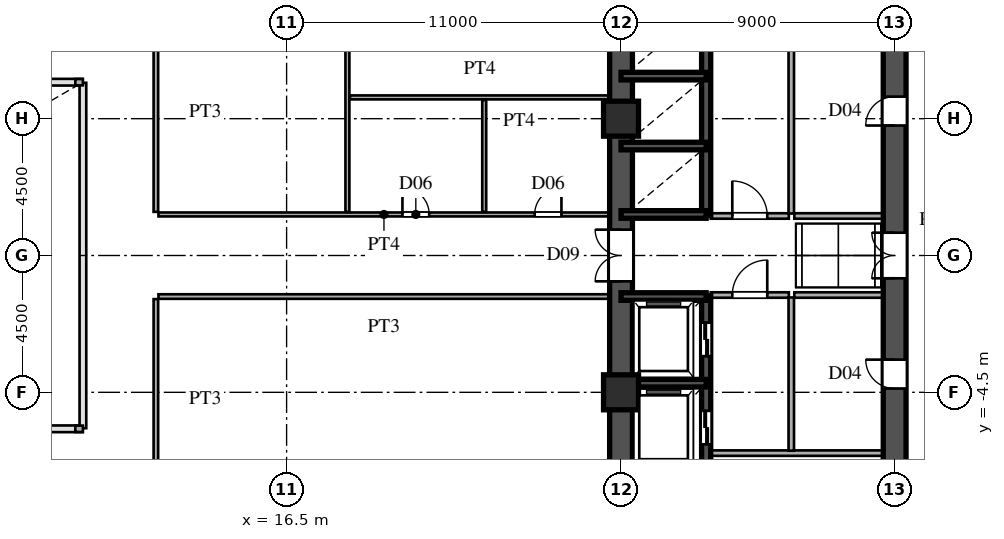
"""IFC4 building model, lengths in metres.
Left out: names, types, materials, properties, quantities, classifications, styles, units other than length and angle.
Written with IfcOpenShell. Run it as: python <this file> out.ifc"""

import sys

from ifc_helpers import new_model, si_unit, direction, frame, frame_2d, origin, origin_2d, place, context, subcontext, project, spatial, rectangle, hollow_rectangle, extrude, source, transform, mapped, element, fill, save


model = new_model("IFC4")
c1 = context("Model", 3, precision=1e-05, world=origin(), true_north=direction((0.0, 1.0)))
c2 = subcontext(c1, "Body", "Model", "MODEL_VIEW")
j1 = project(units=[si_unit("LENGTHUNIT", "METRE"), si_unit("PLANEANGLEUNIT", "RADIAN")], contexts=[c1])
p1 = place(None, origin())
s1 = spatial("IfcSite", under=j1, at=p1, CompositionType="ELEMENT")
p2 = place(p1, origin())
s2 = spatial("IfcBuilding", under=s1, at=p2, CompositionType="ELEMENT")
p3 = place(p2, frame((0.0, 0.0, 14.4)))
s3 = spatial("IfcBuildingStorey", under=s2, at=p3, CompositionType="ELEMENT", Elevation=14.4)
m1 = source(origin(), c2, "Body", "SweptSolid", [
    extrude(hollow_rectangle(XDim=1.15, YDim=1.15, WallThickness=0.048, at=origin_2d()), origin(), (0.0, 0.0, 1.0), 4.5),
])
for number, where, z_axis, x_axis in (
    (1, (27.5, -4.5, 0.0), (0.0, 0.0, 1.0), (1.0, 0.0, 0.0)),
    (2, (27.5, 4.5, 0.0), (0.0, 0.0, 1.0), (1.0, 0.0, 0.0)),
):
    element("IfcColumn", number, at=place(p3, frame(where, z_axis=z_axis, x_axis=x_axis)), inside=s3, PredefinedType="COLUMN", context=c2, shape_type="MappedRepresentation", body=[
        mapped(m1, transform((0.0, 0.0, 0.0), scale=1.0)),
    ])
for number, where, z_axis, x_axis in (
    (3, (9.8, -5.7, 0.0), (0.0, 0.0, 1.0), (-1.0, 0.0, 0.0)),
    (4, (9.8, 5.7, 0.0), (0.0, 0.0, 1.0), (-1.0, 0.0, 0.0)),
):
    element("IfcWall", number, at=place(p3, frame(where, z_axis=z_axis, x_axis=x_axis)), inside=s3, PredefinedType="SOLIDWALL", context=c2, shape_type="SweptSolid", body=[
        extrude(rectangle(XDim=0.25, YDim=0.21, at=frame_2d((0.125, 0.0))), origin(), (0.0, 0.0, 1.0), 4.28),
    ])
for number, where, z_axis, x_axis in (
    (5, (27.5, -13.5, 0.0), (0.0, 0.0, 1.0), (0.0, 1.0, 0.0)),
    (6, (27.5, 1.3, 0.0), (0.0, 0.0, 1.0), (0.0, 1.0, 0.0)),
):
    element("IfcWall", number, at=place(p3, frame(where, z_axis=z_axis, x_axis=x_axis)), inside=s3, PredefinedType="SHEAR", context=c2, shape_type="SweptSolid", body=[
        extrude(rectangle(XDim=12.2, YDim=0.75, at=frame_2d((6.1, 0.0))), origin(), (0.0, 0.0, 1.0), 4.28),
    ])
p4 = place(p3, frame((27.5, -1.3, 0.0), z_axis=(0.0, 0.0, 1.0), x_axis=(0.0, 1.0, 0.0)))
e7 = element("IfcWall", 7, at=p4, inside=s3, PredefinedType="SHEAR", context=c2, shape_type="SweptSolid", body=[
    extrude(rectangle(XDim=2.6, YDim=0.75, at=frame_2d((1.3, 0.0))), origin(), (0.0, 0.0, 1.0), 4.28),
])
p5 = place(p4, frame((0.45, 0.0, 0.0)))
e8 = element("IfcOpeningElement", 8, at=p5, cuts=e7, PredefinedType="OPENING", context=c2, shape_type="SweptSolid", body=[
    extrude(rectangle(XDim=1.7, YDim=2.35, at=frame_2d((0.85, 1.175))), frame((0.0, 0.385, 0.0), z_axis=(0.0, -1.0, 0.0), x_axis=(1.0, 0.0, 0.0)), (0.0, 0.0, 1.0), 0.77),
])
p6 = place(p3, frame((36.5, -13.65, 0.0), z_axis=(0.0, 0.0, 1.0), x_axis=(0.0, 1.0, 0.0)))
e9 = element("IfcWall", 9, at=p6, inside=s3, PredefinedType="SHEAR", context=c2, shape_type="SweptSolid", body=[
    extrude(rectangle(XDim=7.15, YDim=0.75, at=frame_2d((3.575, 0.0))), origin(), (0.0, 0.0, 1.0), 4.28),
])
p7 = place(p6, frame((4.675, 0.0, 0.0)))
e10 = element("IfcOpeningElement", 10, at=p7, cuts=e9, PredefinedType="OPENING", context=c2, shape_type="SweptSolid", body=[
    extrude(rectangle(XDim=1.15, YDim=2.2, at=frame_2d((0.575, 1.1))), frame((0.0, 0.385, 0.0), z_axis=(0.0, -1.0, 0.0), x_axis=(1.0, 0.0, 0.0)), (0.0, 0.0, 1.0), 0.77),
])
p8 = place(p3, frame((36.5, -1.3, 0.0), z_axis=(0.0, 0.0, 1.0), x_axis=(0.0, 1.0, 0.0)))
e11 = element("IfcWall", 11, at=p8, inside=s3, PredefinedType="SHEAR", context=c2, shape_type="SweptSolid", body=[
    extrude(rectangle(XDim=2.6, YDim=0.75, at=frame_2d((1.3, 0.0))), origin(), (0.0, 0.0, 1.0), 4.28),
])
p9 = place(p8, frame((0.55, 0.0, 0.0)))
e12 = element("IfcOpeningElement", 12, at=p9, cuts=e11, PredefinedType="OPENING", context=c2, shape_type="SweptSolid", body=[
    extrude(rectangle(XDim=1.5, YDim=2.3, at=frame_2d((0.75, 1.15))), frame((0.0, 0.385, 0.0), z_axis=(0.0, -1.0, 0.0), x_axis=(1.0, 0.0, 0.0)), (0.0, 0.0, 1.0), 0.77),
])
p10 = place(p3, frame((36.5, -6.5, 0.0), z_axis=(0.0, 0.0, 1.0), x_axis=(0.0, 1.0, 0.0)))
e13 = element("IfcWall", 13, at=p10, inside=s3, PredefinedType="SHEAR", context=c2, shape_type="SweptSolid", body=[
    extrude(rectangle(XDim=5.2, YDim=0.75, at=frame_2d((2.6, 0.0))), origin(), (0.0, 0.0, 1.0), 4.28),
])
p11 = place(p10, frame((2.125, 0.0, 0.0)))
e14 = element("IfcOpeningElement", 14, at=p11, cuts=e13, PredefinedType="OPENING", context=c2, shape_type="SweptSolid", body=[
    extrude(rectangle(XDim=0.95, YDim=2.15, at=frame_2d((0.475, 1.075))), frame((0.0, 0.385, 0.0), z_axis=(0.0, -1.0, 0.0), x_axis=(1.0, 0.0, 0.0)), (0.0, 0.0, 1.0), 0.77),
])
p12 = place(p3, frame((36.5, 1.3, 0.0), z_axis=(0.0, 0.0, 1.0), x_axis=(0.0, 1.0, 0.0)))
e15 = element("IfcWall", 15, at=p12, inside=s3, PredefinedType="SHEAR", context=c2, shape_type="SweptSolid", body=[
    extrude(rectangle(XDim=6.9, YDim=0.75, at=frame_2d((3.45, 0.0))), origin(), (0.0, 0.0, 1.0), 4.28),
])
p13 = place(p12, frame((2.975, 0.0, 0.0)))
e16 = element("IfcOpeningElement", 16, at=p13, cuts=e15, PredefinedType="OPENING", context=c2, shape_type="SweptSolid", body=[
    extrude(rectangle(XDim=0.95, YDim=2.15, at=frame_2d((0.475, 1.075))), frame((0.0, 0.385, 0.0), z_axis=(0.0, -1.0, 0.0), x_axis=(1.0, 0.0, 0.0)), (0.0, 0.0, 1.0), 0.77),
])
for number, where, z_axis, x_axis in (
    (17, (27.5, -4.2, 0.0), (0.0, 0.0, 1.0), (1.0, 0.0, 0.0)),
    (18, (27.5, -1.35, 0.0), (0.0, 0.0, 1.0), (1.0, 0.0, 0.0)),
    (19, (27.5, 1.35, 0.0), (0.0, 0.0, 1.0), (1.0, 0.0, 0.0)),
    (20, (27.5, 3.6, 0.0), (0.0, 0.0, 1.0), (1.0, 0.0, 0.0)),
    (21, (27.5, 5.9, 0.0), (0.0, 0.0, 1.0), (1.0, 0.0, 0.0)),
):
    element("IfcWall", number, at=place(p3, frame(where, z_axis=z_axis, x_axis=x_axis)), inside=s3, PredefinedType="SHEAR", context=c2, shape_type="SweptSolid", body=[
        extrude(rectangle(XDim=2.8, YDim=0.25, at=frame_2d((1.4, 0.0))), origin(), (0.0, 0.0, 1.0), 4.28),
    ])
p14 = place(p3, frame((30.3, -7.12, 0.0), z_axis=(0.0, 0.0, 1.0), x_axis=(0.0, 1.0, 0.0)))
e22 = element("IfcWall", 22, at=p14, inside=s3, PredefinedType="SHEAR", context=c2, shape_type="SweptSolid", body=[
    extrude(rectangle(XDim=2.92, YDim=0.3, at=frame_2d((1.46, 0.0))), origin(), (0.0, 0.0, 1.0), 4.28),
])
p15 = place(p14, frame((0.91, 0.0, 0.0)))
e23 = element("IfcOpeningElement", 23, at=p15, cuts=e22, PredefinedType="OPENING", context=c2, shape_type="SweptSolid", body=[
    extrude(rectangle(XDim=1.1, YDim=2.2, at=frame_2d((0.55, 1.1))), frame((0.0, 0.16, 0.0), z_axis=(0.0, -1.0, 0.0), x_axis=(1.0, 0.0, 0.0)), (0.0, 0.0, 1.0), 0.32),
])
p16 = place(p3, frame((30.3, -4.2, 0.0), z_axis=(0.0, 0.0, 1.0), x_axis=(0.0, 1.0, 0.0)))
e24 = element("IfcWall", 24, at=p16, inside=s3, PredefinedType="SHEAR", context=c2, shape_type="SweptSolid", body=[
    extrude(rectangle(XDim=2.88, YDim=0.3, at=frame_2d((1.44, 0.0))), origin(), (0.0, 0.0, 1.0), 4.28),
])
p17 = place(p16, frame((0.89, 0.0, 0.0)))
e25 = element("IfcOpeningElement", 25, at=p17, cuts=e24, PredefinedType="OPENING", context=c2, shape_type="SweptSolid", body=[
    extrude(rectangle(XDim=1.1, YDim=2.2, at=frame_2d((0.55, 1.1))), frame((0.0, 0.16, 0.0), z_axis=(0.0, -1.0, 0.0), x_axis=(1.0, 0.0, 0.0)), (0.0, 0.0, 1.0), 0.32),
])
p18 = place(p3, frame((30.3, 1.32, 0.0), z_axis=(0.0, 0.0, 1.0), x_axis=(0.0, 1.0, 0.0)))
e26 = element("IfcWall", 26, at=p18, inside=s3, PredefinedType="SHEAR", context=c2, shape_type="SweptSolid", body=[
    extrude(rectangle(XDim=2.28, YDim=0.3, at=frame_2d((1.14, 0.0))), origin(), (0.0, 0.0, 1.0), 4.28),
])
p19 = place(p3, frame((30.3, 3.6, 0.0), z_axis=(0.0, 0.0, 1.0), x_axis=(0.0, 1.0, 0.0)))
e27 = element("IfcWall", 27, at=p19, inside=s3, PredefinedType="SHEAR", context=c2, shape_type="SweptSolid", body=[
    extrude(rectangle(XDim=2.3, YDim=0.3, at=frame_2d((1.15, 0.0))), origin(), (0.0, 0.0, 1.0), 4.28),
])
p20 = place(p3, frame((30.3, 5.9, 0.0), z_axis=(0.0, 0.0, 1.0), x_axis=(0.0, 1.0, 0.0)))
e28 = element("IfcWall", 28, at=p20, inside=s3, PredefinedType="SHEAR", context=c2, shape_type="SweptSolid", body=[
    extrude(rectangle(XDim=2.25, YDim=0.3, at=frame_2d((1.125, 0.0))), origin(), (0.0, 0.0, 1.0), 4.28),
])
p21 = place(p3, frame((30.45, -6.5, 0.0), z_axis=(0.0, 0.0, 1.0), x_axis=(1.0, 0.0, 0.0)))
e29 = element("IfcWall", 29, at=p21, inside=s3, PredefinedType="PARTITIONING", context=c2, shape_type="SweptSolid", body=[
    extrude(rectangle(XDim=5.7, YDim=0.18, at=frame_2d((2.85, 0.0))), origin(), (0.0, 0.0, 1.0), 4.28),
])
p22 = place(p3, frame((33.1, -6.42, 0.0), z_axis=(0.0, 0.0, 1.0), x_axis=(0.0, 1.0, 0.0)))
e30 = element("IfcWall", 30, at=p22, inside=s3, PredefinedType="PARTITIONING", context=c2, shape_type="SweptSolid", body=[
    extrude(rectangle(XDim=5.04, YDim=0.18, at=frame_2d((2.52, 0.0))), origin(), (0.0, 0.0, 1.0), 4.28),
])
p23 = place(p3, frame((33.1, 1.38, 0.0), z_axis=(0.0, 0.0, 1.0), x_axis=(0.0, 1.0, 0.0)))
e31 = element("IfcWall", 31, at=p23, inside=s3, PredefinedType="PARTITIONING", context=c2, shape_type="SweptSolid", body=[
    extrude(rectangle(XDim=6.74, YDim=0.18, at=frame_2d((3.37, 0.0))), origin(), (0.0, 0.0, 1.0), 4.28),
])
p24 = place(p3, frame((30.45, -1.3, 0.0), z_axis=(0.0, 0.0, 1.0), x_axis=(1.0, 0.0, 0.0)))
e32 = element("IfcWall", 32, at=p24, inside=s3, PredefinedType="PARTITIONING", context=c2, shape_type="SweptSolid", body=[
    extrude(rectangle(XDim=2.57, YDim=0.18, at=frame_2d((1.285, 0.0))), origin(), (0.0, 0.0, 1.0), 4.28),
])
p25 = place(p24, frame((0.71, 0.0, 0.0)))
e33 = element("IfcOpeningElement", 33, at=p25, cuts=e32, PredefinedType="OPENING", context=c2, shape_type="SweptSolid", body=[
    extrude(rectangle(XDim=1.15, YDim=2.2, at=frame_2d((0.575, 1.1))), frame((0.0, 0.1, 0.0), z_axis=(0.0, -1.0, 0.0), x_axis=(1.0, 0.0, 0.0)), (0.0, 0.0, 1.0), 0.2),
])
p26 = place(p3, frame((30.45, 1.3, 0.0), z_axis=(0.0, 0.0, 1.0), x_axis=(1.0, 0.0, 0.0)))
e34 = element("IfcWall", 34, at=p26, inside=s3, PredefinedType="PARTITIONING", context=c2, shape_type="SweptSolid", body=[
    extrude(rectangle(XDim=2.57, YDim=0.18, at=frame_2d((1.285, 0.0))), origin(), (0.0, 0.0, 1.0), 4.28),
])
p27 = place(p26, frame((0.71, 0.0, 0.0)))
e35 = element("IfcOpeningElement", 35, at=p27, cuts=e34, PredefinedType="OPENING", context=c2, shape_type="SweptSolid", body=[
    extrude(rectangle(XDim=1.15, YDim=2.2, at=frame_2d((0.575, 1.1))), frame((0.0, 0.1, 0.0), z_axis=(0.0, -1.0, 0.0), x_axis=(1.0, 0.0, 0.0)), (0.0, 0.0, 1.0), 0.2),
])
for number, where, z_axis, x_axis in (
    (36, (33.2, -1.3, 0.0), (0.0, 0.0, 1.0), (1.0, 0.0, 0.0)),
    (37, (33.2, 1.3, 0.0), (0.0, 0.0, 1.0), (1.0, 0.0, 0.0)),
):
    element("IfcWall", number, at=place(p3, frame(where, z_axis=z_axis, x_axis=x_axis)), inside=s3, PredefinedType="PARTITIONING", context=c2, shape_type="SweptSolid", body=[
        extrude(rectangle(XDim=2.95, YDim=0.18, at=frame_2d((1.475, 0.0))), origin(), (0.0, 0.0, 1.0), 4.28),
    ])
p28 = place(p3, frame((12.285, -1.35, 0.0), z_axis=(0.0, 0.0, 1.0), x_axis=(1.0, 0.0, 0.0)))
e38 = element("IfcWall", 38, at=p28, inside=s3, PredefinedType="PARTITIONING", context=c2, shape_type="SweptSolid", body=[
    extrude(rectangle(XDim=14.835, YDim=0.15, at=frame_2d((7.417, 0.0))), origin(), (0.0, 0.0, 1.0), 4.28),
])
p29 = place(p3, frame((12.285, 1.35, 0.0), z_axis=(0.0, 0.0, 1.0), x_axis=(1.0, 0.0, 0.0)))
e39 = element("IfcWall", 39, at=p29, inside=s3, PredefinedType="PARTITIONING", context=c2, shape_type="SweptSolid", body=[
    extrude(rectangle(XDim=14.835, YDim=0.13, at=frame_2d((7.417, 0.0))), origin(), (0.0, 0.0, 1.0), 4.28),
])
p30 = place(p29, frame((8.025, 0.0, 0.0)))
e40 = element("IfcOpeningElement", 40, at=p30, cuts=e39, PredefinedType="OPENING", context=c2, shape_type="SweptSolid", body=[
    extrude(rectangle(XDim=0.88, YDim=2.1, at=frame_2d((0.44, 1.05))), frame((0.0, 0.075, 0.0), z_axis=(0.0, -1.0, 0.0), x_axis=(1.0, 0.0, 0.0)), (0.0, 0.0, 1.0), 0.15),
])
p31 = place(p29, frame((12.375, 0.0, 0.0)))
e41 = element("IfcOpeningElement", 41, at=p31, cuts=e39, PredefinedType="OPENING", context=c2, shape_type="SweptSolid", body=[
    extrude(rectangle(XDim=0.88, YDim=2.1, at=frame_2d((0.44, 1.05))), frame((0.0, 0.075, 0.0), z_axis=(0.0, -1.0, 0.0), x_axis=(1.0, 0.0, 0.0)), (0.0, 0.0, 1.0), 0.15),
])
p32 = place(p3, frame((18.585, 5.2, 0.0), z_axis=(0.0, 0.0, 1.0), x_axis=(1.0, 0.0, 0.0)))
e42 = element("IfcWall", 42, at=p32, inside=s3, PredefinedType="PARTITIONING", context=c2, shape_type="SweptSolid", body=[
    extrude(rectangle(XDim=8.535, YDim=0.13, at=frame_2d((4.268, 0.0))), origin(), (0.0, 0.0, 1.0), 4.28),
])
for number, where, z_axis, x_axis in (
    (43, (12.2, -8.015, 0.0), (0.0, 0.0, 1.0), (0.0, 1.0, 0.0)),
    (44, (12.2, 1.435, 0.0), (0.0, 0.0, 1.0), (0.0, 1.0, 0.0)),
):
    element("IfcWall", number, at=place(p3, frame(where, z_axis=z_axis, x_axis=x_axis)), inside=s3, PredefinedType="PARTITIONING", context=c2, shape_type="SweptSolid", body=[
        extrude(rectangle(XDim=6.58, YDim=0.15, at=frame_2d((3.29, 0.0))), origin(), (0.0, 0.0, 1.0), 4.28),
    ])
p33 = place(p3, frame((18.5, 1.435, 0.0), z_axis=(0.0, 0.0, 1.0), x_axis=(0.0, 1.0, 0.0)))
e45 = element("IfcWall", 45, at=p33, inside=s3, PredefinedType="PARTITIONING", context=c2, shape_type="SweptSolid", body=[
    extrude(rectangle(XDim=11.9, YDim=0.13, at=frame_2d((5.95, 0.0))), origin(), (0.0, 0.0, 1.0), 4.28),
])
p34 = place(p33, frame((7.44, 0.0, 0.0)))
e46 = element("IfcOpeningElement", 46, at=p34, cuts=e45, PredefinedType="OPENING", context=c2, shape_type="SweptSolid", body=[
    extrude(rectangle(XDim=0.95, YDim=2.15, at=frame_2d((0.475, 1.075))), frame((0.0, 0.075, 0.0), z_axis=(0.0, -1.0, 0.0), x_axis=(1.0, 0.0, 0.0)), (0.0, 0.0, 1.0), 0.15),
])
p35 = place(p3, frame((23.0, 1.435, 0.0), z_axis=(0.0, 0.0, 1.0), x_axis=(0.0, 1.0, 0.0)))
e47 = element("IfcWall", 47, at=p35, inside=s3, PredefinedType="PARTITIONING", context=c2, shape_type="SweptSolid", body=[
    extrude(rectangle(XDim=3.68, YDim=0.13, at=frame_2d((1.84, 0.0))), origin(), (0.0, 0.0, 1.0), 4.28),
])
m2 = source(origin(), c2, "Body", "SweptSolid", [
    extrude(rectangle(XDim=1.7, YDim=2.35, at=frame_2d((0.85, 1.175))), frame((0.0, 0.025, 0.0), z_axis=(0.0, -1.0, 0.0), x_axis=(1.0, 0.0, 0.0)), (0.0, 0.0, 1.0), 0.05),
])
p36 = place(p5, origin())
e48 = element("IfcDoor", 48, at=p36, inside=s3, OperationType="DOUBLE_SWING_LEFT", PredefinedType="DOOR", context=c2, shape_type="MappedRepresentation", body=[
    mapped(m2, transform((0.0, 0.0, 0.0), scale=1.0)),
])
fill(e8, e48)
m3 = source(origin(), c2, "Body", "SweptSolid", [
    extrude(rectangle(XDim=1.5, YDim=2.3, at=frame_2d((0.75, 1.15))), frame((0.0, 0.025, 0.0), z_axis=(0.0, -1.0, 0.0), x_axis=(1.0, 0.0, 0.0)), (0.0, 0.0, 1.0), 0.05),
])
p37 = place(p9, origin())
e49 = element("IfcDoor", 49, at=p37, inside=s3, OperationType="DOUBLE_SWING_LEFT", PredefinedType="DOOR", context=c2, shape_type="MappedRepresentation", body=[
    mapped(m3, transform((0.0, 0.0, 0.0), scale=1.0)),
])
fill(e12, e49)
m4 = source(origin(), c2, "Body", "SweptSolid", [
    extrude(rectangle(XDim=0.95, YDim=2.15, at=frame_2d((0.475, 1.075))), frame((0.0, 0.025, 0.0), z_axis=(0.0, -1.0, 0.0), x_axis=(1.0, 0.0, 0.0)), (0.0, 0.0, 1.0), 0.05),
])
p38 = place(p11, origin())
e50 = element("IfcDoor", 50, at=p38, inside=s3, OperationType="SINGLE_SWING_RIGHT", PredefinedType="DOOR", context=c2, shape_type="MappedRepresentation", body=[
    mapped(m4, transform((0.0, 0.0, 0.0), scale=1.0)),
])
fill(e14, e50)
p39 = place(p13, origin())
e51 = element("IfcDoor", 51, at=p39, inside=s3, OperationType="SINGLE_SWING_LEFT", PredefinedType="DOOR", context=c2, shape_type="MappedRepresentation", body=[
    mapped(m4, transform((0.0, 0.0, 0.0), scale=1.0)),
])
fill(e16, e51)
m5 = source(origin(), c2, "Body", "SweptSolid", [
    extrude(rectangle(XDim=1.1, YDim=2.2, at=frame_2d((0.55, 1.1))), frame((0.0, 0.025, 0.0), z_axis=(0.0, -1.0, 0.0), x_axis=(1.0, 0.0, 0.0)), (0.0, 0.0, 1.0), 0.05),
])
p40 = place(p15, origin())
e52 = element("IfcDoor", 52, at=p40, inside=s3, OperationType="DOUBLE_DOOR_SLIDING", PredefinedType="DOOR", context=c2, shape_type="MappedRepresentation", body=[
    mapped(m5, transform((0.0, 0.0, 0.0), scale=1.0)),
])
fill(e23, e52)
p41 = place(p17, origin())
e53 = element("IfcDoor", 53, at=p41, inside=s3, OperationType="DOUBLE_DOOR_SLIDING", PredefinedType="DOOR", context=c2, shape_type="MappedRepresentation", body=[
    mapped(m5, transform((0.0, 0.0, 0.0), scale=1.0)),
])
fill(e25, e53)
m6 = source(origin(), c2, "Body", "SweptSolid", [
    extrude(rectangle(XDim=1.15, YDim=2.2, at=frame_2d((0.575, 1.1))), frame((0.0, 0.025, 0.0), z_axis=(0.0, -1.0, 0.0), x_axis=(1.0, 0.0, 0.0)), (0.0, 0.0, 1.0), 0.05),
])
p42 = place(p25, origin())
e54 = element("IfcDoor", 54, at=p42, inside=s3, OperationType="SINGLE_SWING_RIGHT", PredefinedType="DOOR", context=c2, shape_type="MappedRepresentation", body=[
    mapped(m6, transform((0.0, 0.0, 0.0), scale=1.0)),
])
fill(e33, e54)
p43 = place(p27, origin())
e55 = element("IfcDoor", 55, at=p43, inside=s3, OperationType="SINGLE_SWING_LEFT", PredefinedType="DOOR", context=c2, shape_type="MappedRepresentation", body=[
    mapped(m6, transform((0.0, 0.0, 0.0), scale=1.0)),
])
fill(e35, e55)
m7 = source(origin(), c2, "Body", "SweptSolid", [
    extrude(rectangle(XDim=0.88, YDim=2.1, at=frame_2d((0.44, 1.05))), frame((0.0, 0.025, 0.0), z_axis=(0.0, -1.0, 0.0), x_axis=(1.0, 0.0, 0.0)), (0.0, 0.0, 1.0), 0.05),
])
p44 = place(p30, origin())
e56 = element("IfcDoor", 56, at=p44, inside=s3, OperationType="SINGLE_SWING_LEFT", PredefinedType="DOOR", context=c2, shape_type="MappedRepresentation", body=[
    mapped(m7, transform((0.0, 0.0, 0.0), scale=1.0)),
])
fill(e40, e56)
p45 = place(p31, origin())
e57 = element("IfcDoor", 57, at=p45, inside=s3, OperationType="SINGLE_SWING_RIGHT", PredefinedType="DOOR", context=c2, shape_type="MappedRepresentation", body=[
    mapped(m7, transform((0.0, 0.0, 0.0), scale=1.0)),
])
fill(e41, e57)
save(model, sys.argv[1])
